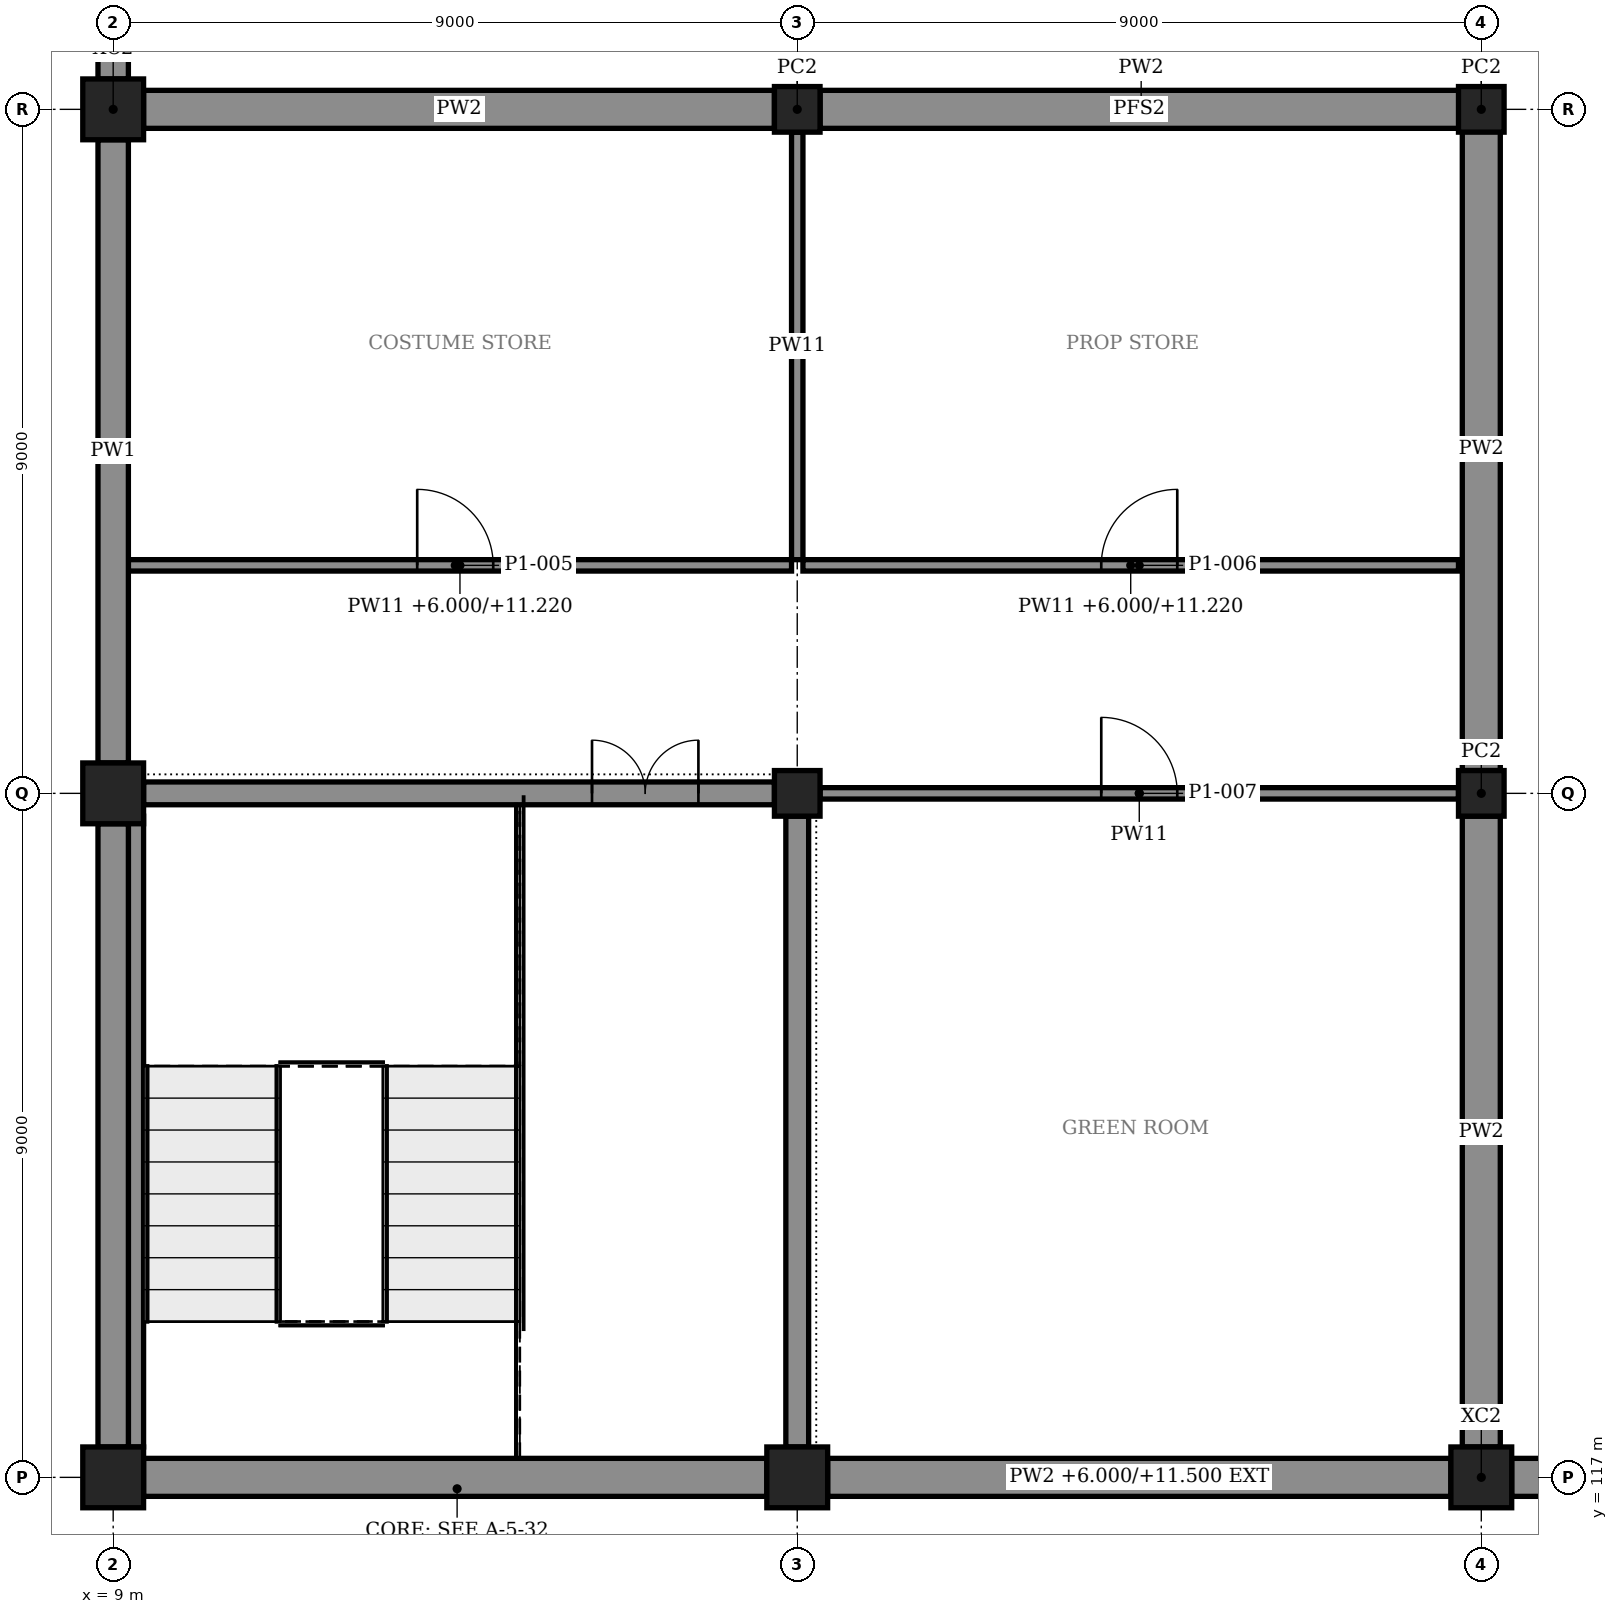
"""IFC4 building model, lengths in metres.
Left out: names, types, materials, properties, quantities, classifications, styles, units other than length and angle.
Written with IfcOpenShell. Run it as: python <this file> out.ifc"""

import sys

from ifc_helpers import new_model, si_unit, direction, frame, frame_2d, origin, origin_2d, place, context, subcontext, project, spatial, rectangle, extrude, element, fill, save


model = new_model("IFC4")
c1 = context("Model", 3, precision=1e-05, world=origin(), true_north=direction((0.0, 1.0)))
c2 = subcontext(c1, "Body", "Model", "MODEL_VIEW")
j1 = project(units=[si_unit("LENGTHUNIT", "METRE"), si_unit("PLANEANGLEUNIT", "RADIAN")], contexts=[c1])
p1 = place(None, origin())
s1 = spatial("IfcSite", under=j1, at=p1, CompositionType="ELEMENT")
p2 = place(p1, origin())
s2 = spatial("IfcBuilding", under=s1, at=p2, CompositionType="ELEMENT")
p3 = place(p2, frame((0.0, 0.0, 6.0)))
s3 = spatial("IfcBuildingStorey", under=s2, at=p3, CompositionType="ELEMENT", Elevation=6.0)
for number, where, z_axis, x_axis in (
    (1, (9.0, 117.0, 0.0), (0.0, 0.0, 1.0), (1.0, 0.0, 0.0)),
    (2, (18.0, 117.0, 0.0), (0.0, 0.0, 1.0), (1.0, 0.0, 0.0)),
    (3, (27.0, 117.0, 0.0), (0.0, 0.0, 1.0), (1.0, 0.0, 0.0)),
    (4, (9.0, 126.0, 0.0), (0.0, 0.0, 1.0), (1.0, 0.0, 0.0)),
):
    element("IfcColumn", number, at=place(p3, frame(where, z_axis=z_axis, x_axis=x_axis)), inside=s3, PredefinedType="COLUMN", context=c2, shape_type="SweptSolid", body=[
        extrude(rectangle(XDim=0.8, YDim=0.8, at=origin_2d()), origin(), (0.0, 0.0, 1.0), 5.5),
    ])
for number, where, z_axis, x_axis in (
    (5, (18.0, 126.0, 0.0), (0.0, 0.0, 1.0), (1.0, 0.0, 0.0)),
    (6, (27.0, 126.0, 0.0), (0.0, 0.0, 1.0), (1.0, 0.0, 0.0)),
):
    element("IfcColumn", number, at=place(p3, frame(where, z_axis=z_axis, x_axis=x_axis)), inside=s3, PredefinedType="COLUMN", context=c2, shape_type="SweptSolid", body=[
        extrude(rectangle(XDim=0.6, YDim=0.6, at=origin_2d()), origin(), (0.0, 0.0, 1.0), 5.5),
    ])
p4 = place(p3, frame((9.0, 135.0, 0.0), z_axis=(0.0, 0.0, 1.0), x_axis=(1.0, 0.0, 0.0)))
e7 = element("IfcColumn", 7, at=p4, inside=s3, PredefinedType="COLUMN", context=c2, shape_type="SweptSolid", body=[
    extrude(rectangle(XDim=0.8, YDim=0.8, at=origin_2d()), origin(), (0.0, 0.0, 1.0), 5.5),
])
for number, where, z_axis, x_axis in (
    (8, (18.0, 135.0, 0.0), (0.0, 0.0, 1.0), (1.0, 0.0, 0.0)),
    (9, (27.0, 135.0, 0.0), (0.0, 0.0, 1.0), (1.0, 0.0, 0.0)),
):
    element("IfcColumn", number, at=place(p3, frame(where, z_axis=z_axis, x_axis=x_axis)), inside=s3, PredefinedType="COLUMN", context=c2, shape_type="SweptSolid", body=[
        extrude(rectangle(XDim=0.6, YDim=0.6, at=origin_2d()), origin(), (0.0, 0.0, 1.0), 5.5),
    ])
for number, where, z_axis, x_axis in (
    (10, (9.0, 117.4, 0.0), (0.0, 0.0, 1.0), (0.0, 1.0, 0.0)),
    (11, (9.0, 126.4, 0.0), (0.0, 0.0, 1.0), (0.0, 1.0, 0.0)),
    (12, (9.0, 135.4, 0.0), (0.0, 0.0, 1.0), (0.0, 1.0, 0.0)),
):
    element("IfcWall", number, at=place(p3, frame(where, z_axis=z_axis, x_axis=x_axis)), inside=s3, PredefinedType="SOLIDWALL", context=c2, shape_type="SweptSolid", body=[
        extrude(rectangle(XDim=8.2, YDim=0.4, at=frame_2d((4.1, 0.0))), origin(), (0.0, 0.0, 1.0), 5.5),
    ])
for number, where, z_axis, x_axis in (
    (13, (9.4, 117.0, 0.0), (0.0, 0.0, 1.0), (1.0, 0.0, 0.0)),
    (14, (18.4, 117.0, 0.0), (0.0, 0.0, 1.0), (1.0, 0.0, 0.0)),
    (15, (27.4, 117.0, 0.0), (0.0, 0.0, 1.0), (1.0, 0.0, 0.0)),
):
    element("IfcWall", number, at=place(p3, frame(where, z_axis=z_axis, x_axis=x_axis)), inside=s3, PredefinedType="SOLIDWALL", context=c2, shape_type="SweptSolid", body=[
        extrude(rectangle(XDim=8.2, YDim=0.5, at=frame_2d((4.1, 0.0))), origin(), (0.0, 0.0, 1.0), 5.5),
    ])
p5 = place(p3, frame((9.4, 135.0, 0.0), z_axis=(0.0, 0.0, 1.0), x_axis=(1.0, 0.0, 0.0)))
e16 = element("IfcWall", 16, at=p5, inside=s3, PredefinedType="SOLIDWALL", context=c2, shape_type="SweptSolid", body=[
    extrude(rectangle(XDim=8.3, YDim=0.5, at=frame_2d((4.15, 0.0))), origin(), (0.0, 0.0, 1.0), 4.32),
])
p6 = place(p3, frame((18.3, 135.0, 0.0), z_axis=(0.0, 0.0, 1.0), x_axis=(1.0, 0.0, 0.0)))
e17 = element("IfcWall", 17, at=p6, inside=s3, PredefinedType="SOLIDWALL", context=c2, shape_type="SweptSolid", body=[
    extrude(rectangle(XDim=8.45, YDim=0.5, at=frame_2d((4.225, 0.0))), origin(), (0.0, 0.0, 1.0), 4.32),
])
p7 = place(p3, frame((27.0, 117.4, 0.0), z_axis=(0.0, 0.0, 1.0), x_axis=(0.0, 1.0, 0.0)))
e18 = element("IfcWall", 18, at=p7, inside=s3, PredefinedType="SOLIDWALL", context=c2, shape_type="SweptSolid", body=[
    extrude(rectangle(XDim=8.3, YDim=0.5, at=frame_2d((4.15, 0.0))), origin(), (0.0, 0.0, 1.0), 4.32),
])
p8 = place(p3, frame((27.0, 126.3, 0.0), z_axis=(0.0, 0.0, 1.0), x_axis=(0.0, 1.0, 0.0)))
e19 = element("IfcWall", 19, at=p8, inside=s3, PredefinedType="SOLIDWALL", context=c2, shape_type="SweptSolid", body=[
    extrude(rectangle(XDim=8.45, YDim=0.5, at=frame_2d((4.225, 0.0))), origin(), (0.0, 0.0, 1.0), 4.32),
])
p9 = place(p3, frame((18.0, 117.4, 0.0), z_axis=(0.0, 0.0, 1.0), x_axis=(0.0, 1.0, 0.0)))
e20 = element("IfcWall", 20, at=p9, inside=s3, PredefinedType="SOLIDWALL", context=c2, shape_type="SweptSolid", body=[
    extrude(rectangle(XDim=8.3, YDim=0.3, at=frame_2d((4.15, 0.0))), origin(), (0.0, 0.0, 1.0), 4.32),
])
p10 = place(p3, frame((9.4, 126.0, 0.0), z_axis=(0.0, 0.0, 1.0), x_axis=(1.0, 0.0, 0.0)))
e21 = element("IfcWall", 21, at=p10, inside=s3, PredefinedType="SOLIDWALL", context=c2, shape_type="SweptSolid", body=[
    extrude(rectangle(XDim=8.3, YDim=0.3, at=frame_2d((4.15, 0.0))), origin(), (0.0, 0.0, 1.0), 4.32),
])
p11 = place(p10, frame((5.9, 0.0, 0.0)))
e22 = element("IfcOpeningElement", 22, at=p11, cuts=e21, PredefinedType="OPENING", context=c2, shape_type="SweptSolid", body=[
    extrude(rectangle(XDim=1.4, YDim=2.4, at=frame_2d((0.7, 1.2))), frame((0.0, 0.16, 0.0), z_axis=(0.0, -1.0, 0.0), x_axis=(1.0, 0.0, 0.0)), (0.0, 0.0, 1.0), 0.32),
])
p12 = place(p3, frame((9.3, 117.4, 0.0), z_axis=(0.0, 0.0, 1.0), x_axis=(0.0, 1.0, 0.0)))
e23 = element("IfcWall", 23, at=p12, inside=s3, PredefinedType="SOLIDWALL", context=c2, shape_type="SweptSolid", body=[
    extrude(rectangle(XDim=8.3, YDim=0.2, at=frame_2d((4.15, 0.0))), origin(), (0.0, 0.0, 1.0), 5.22),
])
p13 = place(p3, frame((9.2, 129.0, 0.0), z_axis=(0.0, 0.0, 1.0), x_axis=(1.0, 0.0, 0.0)))
e24 = element("IfcWall", 24, at=p13, inside=s3, PredefinedType="PARTITIONING", context=c2, shape_type="SweptSolid", body=[
    extrude(rectangle(XDim=8.725, YDim=0.15, at=frame_2d((4.363, 0.0))), origin(), (0.0, 0.0, 1.0), 5.22),
])
p14 = place(p13, frame((3.8, 0.0, 0.0)))
e25 = element("IfcOpeningElement", 25, at=p14, cuts=e24, PredefinedType="OPENING", context=c2, shape_type="SweptSolid", body=[
    extrude(rectangle(XDim=1.0, YDim=2.4, at=frame_2d((0.5, 1.2))), frame((0.0, 0.085, 0.0), z_axis=(0.0, -1.0, 0.0), x_axis=(1.0, 0.0, 0.0)), (0.0, 0.0, 1.0), 0.17),
])
p15 = place(p3, frame((18.075, 129.0, 0.0), z_axis=(0.0, 0.0, 1.0), x_axis=(1.0, 0.0, 0.0)))
e26 = element("IfcWall", 26, at=p15, inside=s3, PredefinedType="PARTITIONING", context=c2, shape_type="SweptSolid", body=[
    extrude(rectangle(XDim=8.625, YDim=0.15, at=frame_2d((4.312, 0.0))), origin(), (0.0, 0.0, 1.0), 5.22),
])
p16 = place(p15, frame((3.925, 0.0, 0.0)))
e27 = element("IfcOpeningElement", 27, at=p16, cuts=e26, PredefinedType="OPENING", context=c2, shape_type="SweptSolid", body=[
    extrude(rectangle(XDim=1.0, YDim=2.4, at=frame_2d((0.5, 1.2))), frame((0.0, 0.085, 0.0), z_axis=(0.0, -1.0, 0.0), x_axis=(1.0, 0.0, 0.0)), (0.0, 0.0, 1.0), 0.17),
])
p17 = place(p3, frame((18.0, 129.075, 0.0), z_axis=(0.0, 0.0, 1.0), x_axis=(0.0, 1.0, 0.0)))
e28 = element("IfcWall", 28, at=p17, inside=s3, PredefinedType="PARTITIONING", context=c2, shape_type="SweptSolid", body=[
    extrude(rectangle(XDim=5.625, YDim=0.15, at=frame_2d((2.812, 0.0))), origin(), (0.0, 0.0, 1.0), 4.32),
])
p18 = place(p3, frame((18.3, 126.0, 0.0), z_axis=(0.0, 0.0, 1.0), x_axis=(1.0, 0.0, 0.0)))
e29 = element("IfcWall", 29, at=p18, inside=s3, PredefinedType="PARTITIONING", context=c2, shape_type="SweptSolid", body=[
    extrude(rectangle(XDim=8.4, YDim=0.15, at=frame_2d((4.2, 0.0))), origin(), (0.0, 0.0, 1.0), 4.32),
])
p19 = place(p18, frame((3.7, 0.0, 0.0)))
e30 = element("IfcOpeningElement", 30, at=p19, cuts=e29, PredefinedType="OPENING", context=c2, shape_type="SweptSolid", body=[
    extrude(rectangle(XDim=1.0, YDim=2.4, at=frame_2d((0.5, 1.2))), frame((0.0, 0.085, 0.0), z_axis=(0.0, -1.0, 0.0), x_axis=(1.0, 0.0, 0.0)), (0.0, 0.0, 1.0), 0.17),
])
p20 = place(p11, origin())
e31 = element("IfcDoor", 31, at=p20, inside=s3, OperationType="SINGLE_SWING_LEFT", PredefinedType="DOOR", context=c2, shape_type="SweptSolid", body=[
    extrude(rectangle(XDim=1.4, YDim=2.4, at=frame_2d((0.7, 1.2))), frame((0.0, 0.025, 0.0), z_axis=(0.0, -1.0, 0.0), x_axis=(1.0, 0.0, 0.0)), (0.0, 0.0, 1.0), 0.05),
])
fill(e22, e31)
p21 = place(p14, origin())
e32 = element("IfcDoor", 32, at=p21, inside=s3, OperationType="SINGLE_SWING_LEFT", PredefinedType="DOOR", context=c2, shape_type="SweptSolid", body=[
    extrude(rectangle(XDim=1.0, YDim=2.4, at=frame_2d((0.5, 1.2))), frame((0.0, 0.025, 0.0), z_axis=(0.0, -1.0, 0.0), x_axis=(1.0, 0.0, 0.0)), (0.0, 0.0, 1.0), 0.05),
])
fill(e25, e32)
p22 = place(p16, origin())
e33 = element("IfcDoor", 33, at=p22, inside=s3, OperationType="SINGLE_SWING_RIGHT", PredefinedType="DOOR", context=c2, shape_type="SweptSolid", body=[
    extrude(rectangle(XDim=1.0, YDim=2.4, at=frame_2d((0.5, 1.2))), frame((0.0, 0.025, 0.0), z_axis=(0.0, -1.0, 0.0), x_axis=(1.0, 0.0, 0.0)), (0.0, 0.0, 1.0), 0.05),
])
fill(e27, e33)
p23 = place(p19, origin())
e34 = element("IfcDoor", 34, at=p23, inside=s3, OperationType="SINGLE_SWING_LEFT", PredefinedType="DOOR", context=c2, shape_type="SweptSolid", body=[
    extrude(rectangle(XDim=1.0, YDim=2.4, at=frame_2d((0.5, 1.2))), frame((0.0, 0.025, 0.0), z_axis=(0.0, -1.0, 0.0), x_axis=(1.0, 0.0, 0.0)), (0.0, 0.0, 1.0), 0.05),
])
fill(e30, e34)
save(model, sys.argv[1])
